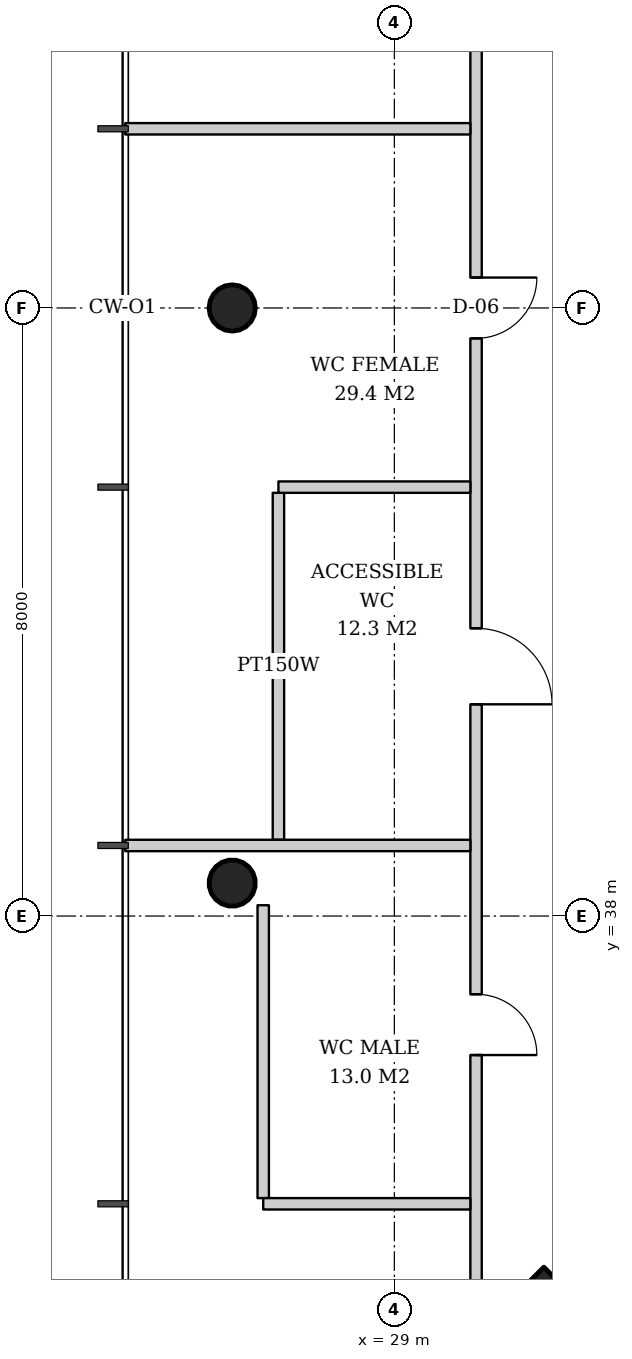
"""IFC4 building model, lengths in metres.
Left out: names, types, materials, properties, quantities, classifications, styles, units other than length and angle.
Written with IfcOpenShell. Run it as: python <this file> out.ifc"""

import sys

from ifc_helpers import new_model, si_unit, direction, frame, frame_2d, origin, origin_2d, place, context, subcontext, project, spatial, rectangle, hollow_circle, extrude, element, fill, save


model = new_model("IFC4")
c1 = context("Model", 3, precision=1e-05, world=origin(), true_north=direction((0.0, 1.0)))
c2 = subcontext(c1, "Body", "Model", "MODEL_VIEW")
j1 = project(units=[si_unit("LENGTHUNIT", "METRE"), si_unit("PLANEANGLEUNIT", "RADIAN")], contexts=[c1])
p1 = place(None, origin())
s1 = spatial("IfcSite", under=j1, at=p1, CompositionType="ELEMENT")
p2 = place(p1, origin())
s2 = spatial("IfcBuilding", under=s1, at=p2, CompositionType="ELEMENT")
p3 = place(p2, frame((0.0, 0.0, 203.4)))
s3 = spatial("IfcBuildingStorey", under=s2, at=p3, CompositionType="ELEMENT", Elevation=203.4)
p4 = place(p3, frame((30.928, 31.928, 0.0), z_axis=(0.031962158256, 0.031962158256, 0.998977898093), x_axis=(-0.707106781187, 0.707106781187, 0.0)))
e1 = element("IfcColumn", 1, at=p4, inside=s3, PredefinedType="COLUMN", context=c2, shape_type="SweptSolid", body=[
    extrude(rectangle(XDim=2.0, YDim=2.0, at=origin_2d()), origin(), (0.0, 0.0, 1.0), 3.804),
])
p5 = place(p3, frame((26.829, 46.0, 0.0), z_axis=(0.031914348339, 0.0, 0.999490607445), x_axis=(0.0, 1.0, 0.0)))
e2 = element("IfcColumn", 2, at=p5, inside=s3, PredefinedType="COLUMN", context=c2, shape_type="SweptSolid", body=[
    extrude(hollow_circle(Radius=0.305, WallThickness=0.025, at=origin_2d()), origin(), (0.0, 0.0, 1.0), 3.802),
])
p6 = place(p3, frame((26.829, 38.414, 0.0), z_axis=(0.031910269556, 0.015987237665, 0.999362868496), x_axis=(-0.447933021895, 0.894067115991, 0.0)))
e3 = element("IfcColumn", 3, at=p6, inside=s3, PredefinedType="COLUMN", context=c2, shape_type="SweptSolid", body=[
    extrude(hollow_circle(Radius=0.305, WallThickness=0.025, at=origin_2d()), origin(), (0.0, 0.0, 1.0), 3.802),
])
p7 = place(p3, frame((27.475, 43.568, 0.0), z_axis=(0.0, 0.0, 1.0), x_axis=(0.0, -1.0, 0.0)))
e4 = element("IfcWall", 4, at=p7, inside=s3, PredefinedType="PARTITIONING", context=c2, shape_type="SweptSolid", body=[
    extrude(rectangle(XDim=4.564, YDim=0.15, at=frame_2d((2.282, 0.0))), origin(), (0.0, 0.0, 1.0), 2.867),
])
p8 = place(p3, frame((27.275, 38.143, 0.0), z_axis=(0.0, 0.0, 1.0), x_axis=(0.0, -1.0, 0.0)))
e5 = element("IfcWall", 5, at=p8, inside=s3, PredefinedType="PARTITIONING", context=c2, shape_type="SweptSolid", body=[
    extrude(rectangle(XDim=3.853, YDim=0.15, at=frame_2d((1.927, 0.0))), origin(), (0.0, 0.0, 1.0), 2.867),
])
p9 = place(p3, frame((30.075, 59.436, 0.0), z_axis=(0.0, 0.0, 1.0), x_axis=(0.0, -1.0, 0.0)))
e6 = element("IfcWall", 6, at=p9, inside=s3, PredefinedType="PARTITIONING", context=c2, shape_type="SweptSolid", body=[
    extrude(rectangle(XDim=26.872, YDim=0.15, at=frame_2d((13.436, 0.0))), origin(), (0.0, 0.0, 1.0), 2.867),
])
p10 = place(p9, frame((3.507, 0.0, 0.0)))
e7 = element("IfcOpeningElement", 7, at=p10, cuts=e6, PredefinedType="OPENING", context=c2, shape_type="SweptSolid", body=[
    extrude(rectangle(XDim=1.0, YDim=2.1, at=frame_2d((0.5, 1.05))), frame((0.0, 0.085, 0.0), z_axis=(0.0, -1.0, 0.0), x_axis=(1.0, 0.0, 0.0)), (0.0, 0.0, 1.0), 0.17),
])
p11 = place(p9, frame((8.221, 0.0, 0.0)))
e8 = element("IfcOpeningElement", 8, at=p11, cuts=e6, PredefinedType="OPENING", context=c2, shape_type="SweptSolid", body=[
    extrude(rectangle(XDim=1.0, YDim=2.1, at=frame_2d((0.5, 1.05))), frame((0.0, 0.085, 0.0), z_axis=(0.0, -1.0, 0.0), x_axis=(1.0, 0.0, 0.0)), (0.0, 0.0, 1.0), 0.17),
])
p12 = place(p9, frame((13.036, 0.0, 0.0)))
e9 = element("IfcOpeningElement", 9, at=p12, cuts=e6, PredefinedType="OPENING", context=c2, shape_type="SweptSolid", body=[
    extrude(rectangle(XDim=0.8, YDim=2.1, at=frame_2d((0.4, 1.05))), frame((0.0, 0.085, 0.0), z_axis=(0.0, -1.0, 0.0), x_axis=(1.0, 0.0, 0.0)), (0.0, 0.0, 1.0), 0.17),
])
p13 = place(p9, frame((17.65, 0.0, 0.0)))
e10 = element("IfcOpeningElement", 10, at=p13, cuts=e6, PredefinedType="OPENING", context=c2, shape_type="SweptSolid", body=[
    extrude(rectangle(XDim=1.0, YDim=2.1, at=frame_2d((0.5, 1.05))), frame((0.0, 0.085, 0.0), z_axis=(0.0, -1.0, 0.0), x_axis=(1.0, 0.0, 0.0)), (0.0, 0.0, 1.0), 0.17),
])
p14 = place(p9, frame((22.464, 0.0, 0.0)))
e11 = element("IfcOpeningElement", 11, at=p14, cuts=e6, PredefinedType="OPENING", context=c2, shape_type="SweptSolid", body=[
    extrude(rectangle(XDim=0.8, YDim=2.1, at=frame_2d((0.4, 1.05))), frame((0.0, 0.085, 0.0), z_axis=(0.0, -1.0, 0.0), x_axis=(1.0, 0.0, 0.0)), (0.0, 0.0, 1.0), 0.17),
])
p15 = place(p3, frame((30.0, 48.357, 0.0), z_axis=(0.0, 0.0, 1.0), x_axis=(-1.0, 0.0, 0.0)))
e12 = element("IfcWall", 12, at=p15, inside=s3, PredefinedType="PARTITIONING", context=c2, shape_type="SweptSolid", body=[
    extrude(rectangle(XDim=4.54, YDim=0.15, at=frame_2d((2.27, 0.0))), origin(), (0.0, 0.0, 1.0), 3.12),
])
p16 = place(p3, frame((30.0, 43.643, 0.0), z_axis=(0.0, 0.0, 1.0), x_axis=(-1.0, 0.0, 0.0)))
e13 = element("IfcWall", 13, at=p16, inside=s3, PredefinedType="PARTITIONING", context=c2, shape_type="SweptSolid", body=[
    extrude(rectangle(XDim=2.525, YDim=0.15, at=frame_2d((1.262, 0.0))), origin(), (0.0, 0.0, 1.0), 2.867),
])
p17 = place(p3, frame((30.0, 38.928, 0.0), z_axis=(0.0, 0.0, 1.0), x_axis=(-1.0, 0.0, 0.0)))
e14 = element("IfcWall", 14, at=p17, inside=s3, PredefinedType="PARTITIONING", context=c2, shape_type="SweptSolid", body=[
    extrude(rectangle(XDim=4.54, YDim=0.15, at=frame_2d((2.27, 0.0))), origin(), (0.0, 0.0, 1.0), 3.12),
])
p18 = place(p3, frame((30.0, 34.214, 0.0), z_axis=(0.0, 0.0, 1.0), x_axis=(-1.0, 0.0, 0.0)))
e15 = element("IfcWall", 15, at=p18, inside=s3, PredefinedType="PARTITIONING", context=c2, shape_type="SweptSolid", body=[
    extrude(rectangle(XDim=2.725, YDim=0.15, at=frame_2d((1.363, 0.0))), origin(), (0.0, 0.0, 1.0), 3.62),
])
p19 = place(p12, origin())
e16 = element("IfcDoor", 16, at=p19, inside=s3, OperationType="SINGLE_SWING_LEFT", PredefinedType="DOOR", context=c2, shape_type="SweptSolid", body=[
    extrude(rectangle(XDim=0.8, YDim=2.1, at=frame_2d((0.4, 1.05))), frame((0.0, 0.025, 0.0), z_axis=(0.0, -1.0, 0.0), x_axis=(1.0, 0.0, 0.0)), (0.0, 0.0, 1.0), 0.05),
])
fill(e9, e16)
p20 = place(p13, origin())
e17 = element("IfcDoor", 17, at=p20, inside=s3, OperationType="SINGLE_SWING_RIGHT", PredefinedType="DOOR", context=c2, shape_type="SweptSolid", body=[
    extrude(rectangle(XDim=1.0, YDim=2.1, at=frame_2d((0.5, 1.05))), frame((0.0, 0.025, 0.0), z_axis=(0.0, -1.0, 0.0), x_axis=(1.0, 0.0, 0.0)), (0.0, 0.0, 1.0), 0.05),
])
fill(e10, e17)
p21 = place(p14, origin())
e18 = element("IfcDoor", 18, at=p21, inside=s3, OperationType="SINGLE_SWING_RIGHT", PredefinedType="DOOR", context=c2, shape_type="SweptSolid", body=[
    extrude(rectangle(XDim=0.8, YDim=2.1, at=frame_2d((0.4, 1.05))), frame((0.0, 0.025, 0.0), z_axis=(0.0, -1.0, 0.0), x_axis=(1.0, 0.0, 0.0)), (0.0, 0.0, 1.0), 0.05),
])
fill(e11, e18)
save(model, sys.argv[1])
